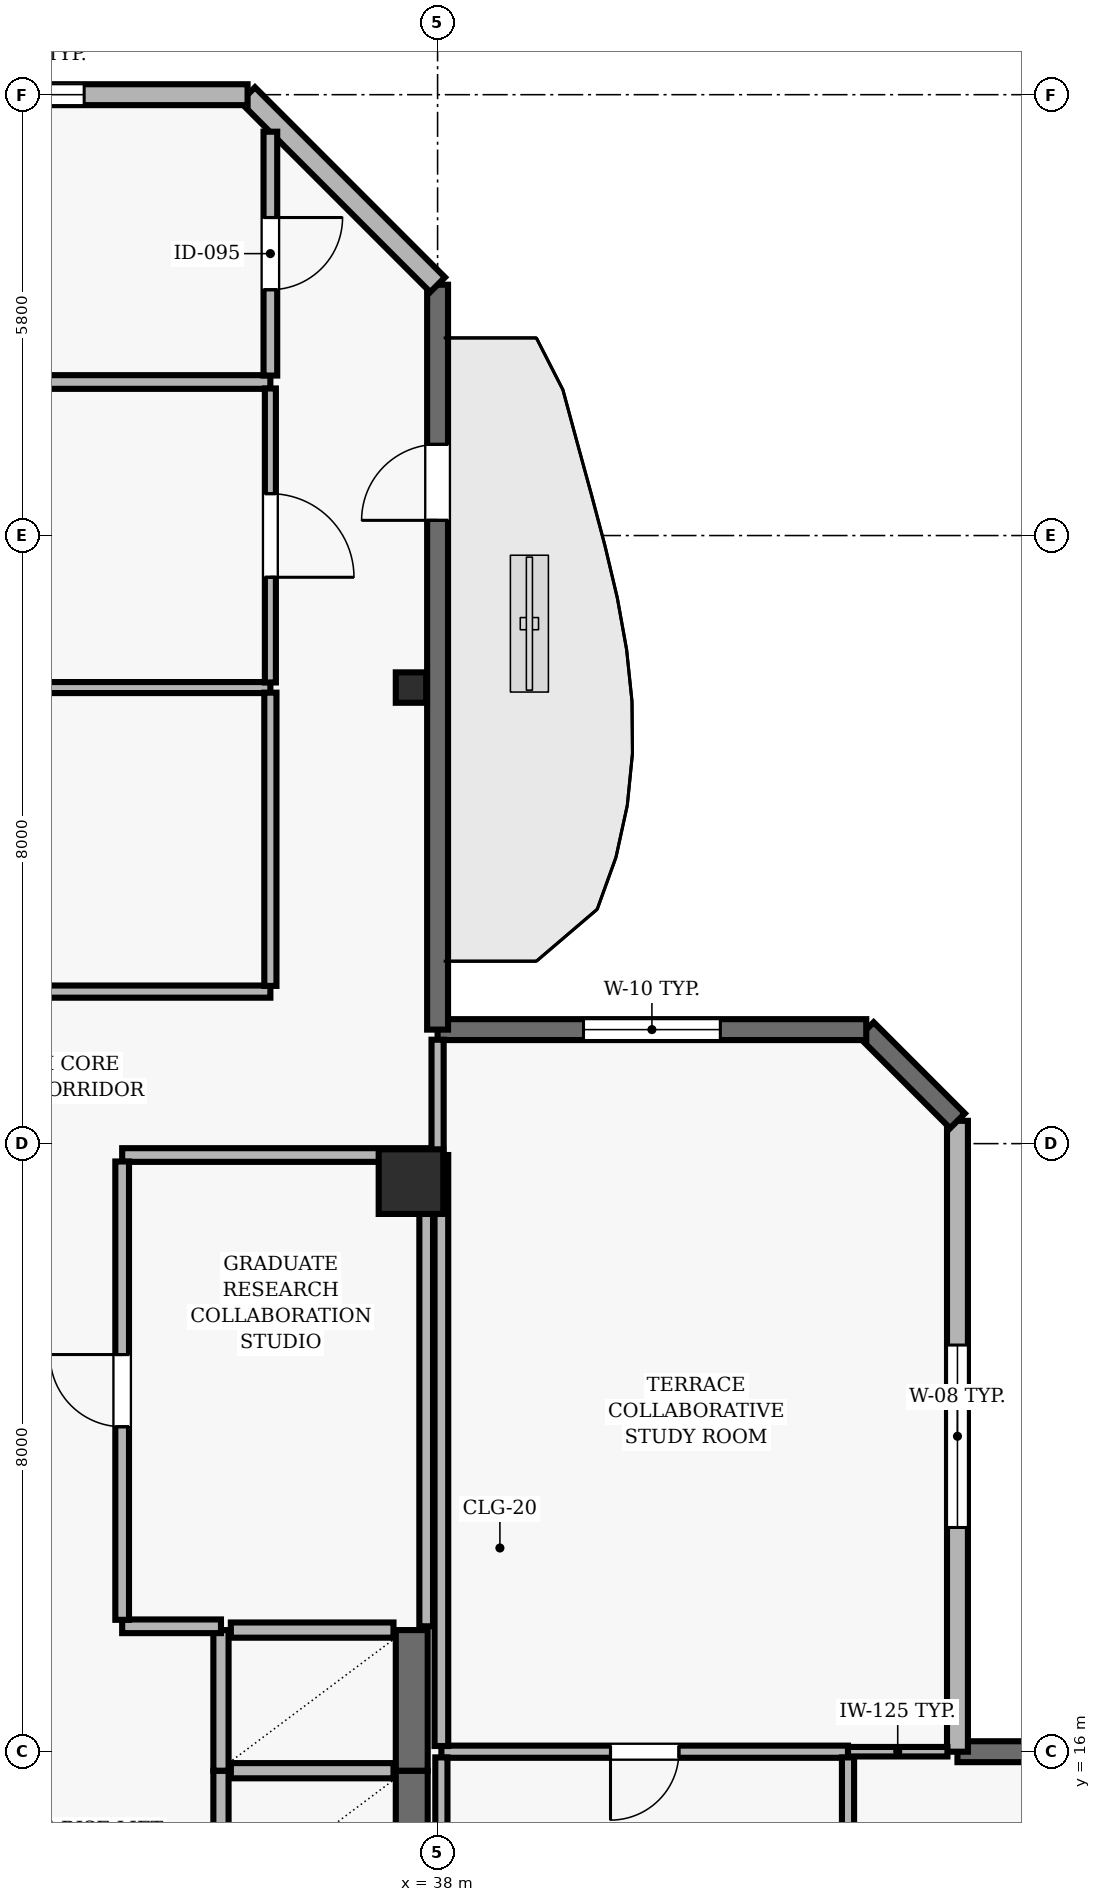
"""IFC4 building model, lengths in metres.
Left out: names, types, materials, properties, quantities, classifications, styles, units other than length and angle.
Written with IfcOpenShell. Run it as: python <this file> out.ifc"""

import sys

from ifc_helpers import new_model, si_unit, direction, frame, frame_2d, origin, origin_2d, place, context, subcontext, project, spatial, rectangle, hollow_rectangle, extrude, element, fill, save


model = new_model("IFC4")
c1 = context("Model", 3, precision=1e-05, world=origin(), true_north=direction((0.0, 1.0)))
c2 = subcontext(c1, "Body", "Model", "MODEL_VIEW")
j1 = project(units=[si_unit("LENGTHUNIT", "METRE"), si_unit("PLANEANGLEUNIT", "RADIAN")], contexts=[c1])
p1 = place(None, origin())
s1 = spatial("IfcSite", under=j1, at=p1, CompositionType="ELEMENT")
p2 = place(p1, origin())
s2 = spatial("IfcBuilding", under=s1, at=p2, CompositionType="ELEMENT")
p3 = place(p2, frame((0.0, 0.0, 256.0)))
s3 = spatial("IfcBuildingStorey", under=s2, at=p3, CompositionType="ELEMENT", Elevation=256.0)
p4 = place(p3, frame((37.65, 23.5, 0.0), z_axis=(0.0, 0.0, 1.0), x_axis=(1.0, 0.0, 0.0)))
e1 = element("IfcColumn", 1, at=p4, inside=s3, PredefinedType="COLUMN", context=c2, shape_type="SweptSolid", body=[
    extrude(rectangle(XDim=0.85, YDim=0.85, at=origin_2d()), origin(), (0.0, 0.0, 1.0), 3.9),
])
p5 = place(p3, frame((37.65, 30.0, 0.0), z_axis=(0.0, 0.0, 1.0), x_axis=(1.0, 0.0, 0.0)))
e2 = element("IfcColumn", 2, at=p5, inside=s3, PredefinedType="COLUMN", context=c2, shape_type="SweptSolid", body=[
    extrude(hollow_rectangle(XDim=0.4, YDim=0.4, WallThickness=0.02, at=origin_2d()), origin(), (0.0, 0.0, 1.0), 3.9),
])
p6 = place(p3, frame((57.3, 16.0, 0.0), z_axis=(0.0, 0.0, 1.0), x_axis=(-1.0, 0.0, 0.0)))
e3 = element("IfcWall", 3, at=p6, inside=s3, PredefinedType="SOLIDWALL", context=c2, shape_type="SweptSolid", body=[
    extrude(rectangle(XDim=12.46, YDim=0.275, at=frame_2d((6.23, 0.0))), origin(), (0.0, 0.0, 1.0), 3.69),
])
p7 = place(p6, frame((1.03, 0.0, 0.0)))
e4 = element("IfcOpeningElement", 4, at=p7, cuts=e3, PredefinedType="OPENING", context=c2, shape_type="SweptSolid", body=[
    extrude(rectangle(XDim=1.0, YDim=2.2, at=frame_2d((0.5, 1.1))), frame((0.0, 0.147, 0.0), z_axis=(0.0, -1.0, 0.0), x_axis=(1.0, 0.0, 0.0)), (0.0, 0.0, 1.0), 0.295),
])
p8 = place(p6, frame((9.345, 0.0, 0.9)))
e5 = element("IfcOpeningElement", 5, at=p8, cuts=e3, PredefinedType="OPENING", context=c2, shape_type="SweptSolid", body=[
    extrude(rectangle(XDim=1.8, YDim=1.8, at=frame_2d((0.9, 0.9))), frame((0.0, 0.147, 0.0), z_axis=(0.0, -1.0, 0.0), x_axis=(1.0, 0.0, 0.0)), (0.0, 0.0, 1.0), 0.295),
])
p9 = place(p3, frame((44.84, 16.0, 0.0), z_axis=(0.0, 0.0, 1.0), x_axis=(0.0, 1.0, 0.0)))
e6 = element("IfcWall", 6, at=p9, inside=s3, PredefinedType="SOLIDWALL", context=c2, shape_type="SweptSolid", body=[
    extrude(rectangle(XDim=8.3, YDim=0.275, at=frame_2d((4.15, 0.0))), origin(), (0.0, 0.0, 1.0), 3.69),
])
p10 = place(p9, frame((2.95, 0.0, 0.9)))
e7 = element("IfcOpeningElement", 7, at=p10, cuts=e6, PredefinedType="OPENING", context=c2, shape_type="SweptSolid", body=[
    extrude(rectangle(XDim=2.4, YDim=1.8, at=frame_2d((1.2, 0.9))), frame((0.0, 0.147, 0.0), z_axis=(0.0, -1.0, 0.0), x_axis=(1.0, 0.0, 0.0)), (0.0, 0.0, 1.0), 0.295),
])
p11 = place(p3, frame((44.84, 24.3, 0.0), z_axis=(0.0, 0.0, 1.0), x_axis=(-0.707178703759, 0.707034851297, 0.0)))
e8 = element("IfcWall", 8, at=p11, inside=s3, PredefinedType="SOLIDWALL", context=c2, shape_type="SweptSolid", body=[
    extrude(rectangle(XDim=1.697, YDim=0.275, at=frame_2d((0.849, 0.0))), origin(), (0.0, 0.0, 1.0), 3.69),
])
p12 = place(p3, frame((43.64, 25.5, 0.0), z_axis=(0.0, 0.0, 1.0), x_axis=(-1.0, 0.0, 0.0)))
e9 = element("IfcWall", 9, at=p12, inside=s3, PredefinedType="SOLIDWALL", context=c2, shape_type="SweptSolid", body=[
    extrude(rectangle(XDim=5.64, YDim=0.275, at=frame_2d((2.82, 0.0))), origin(), (0.0, 0.0, 1.0), 3.69),
])
p13 = place(p12, frame((1.92, 0.0, 0.9)))
e10 = element("IfcOpeningElement", 10, at=p13, cuts=e9, PredefinedType="OPENING", context=c2, shape_type="SweptSolid", body=[
    extrude(rectangle(XDim=1.8, YDim=2.2, at=frame_2d((0.9, 1.1))), frame((0.0, 0.147, 0.0), z_axis=(0.0, -1.0, 0.0), x_axis=(1.0, 0.0, 0.0)), (0.0, 0.0, 1.0), 0.295),
])
p14 = place(p3, frame((38.0, 25.5, 0.0), z_axis=(0.0, 0.0, 1.0), x_axis=(0.0, 1.0, 0.0)))
e11 = element("IfcWall", 11, at=p14, inside=s3, PredefinedType="SOLIDWALL", context=c2, shape_type="SweptSolid", body=[
    extrude(rectangle(XDim=9.8, YDim=0.275, at=frame_2d((4.9, 0.0))), origin(), (0.0, 0.0, 1.0), 3.69),
])
p15 = place(p14, frame((6.7, 0.0, 0.0)))
e12 = element("IfcOpeningElement", 12, at=p15, cuts=e11, PredefinedType="OPENING", context=c2, shape_type="SweptSolid", body=[
    extrude(rectangle(XDim=1.0, YDim=2.2, at=frame_2d((0.5, 1.1))), frame((0.0, 0.147, 0.0), z_axis=(0.0, -1.0, 0.0), x_axis=(1.0, 0.0, 0.0)), (0.0, 0.0, 1.0), 0.295),
])
p16 = place(p3, frame((38.0, 35.3, 0.0), z_axis=(0.0, 0.0, 1.0), x_axis=(-0.707106781187, 0.707106781187, 0.0)))
e13 = element("IfcWall", 13, at=p16, inside=s3, PredefinedType="SOLIDWALL", context=c2, shape_type="SweptSolid", body=[
    extrude(rectangle(XDim=3.536, YDim=0.275, at=frame_2d((1.768, 0.0))), origin(), (0.0, 0.0, 1.0), 3.69),
])
p17 = place(p3, frame((35.5, 37.8, 0.0), z_axis=(0.0, 0.0, 1.0), x_axis=(-1.0, 0.0, 0.0)))
e14 = element("IfcWall", 14, at=p17, inside=s3, PredefinedType="SOLIDWALL", context=c2, shape_type="SweptSolid", body=[
    extrude(rectangle(XDim=11.0, YDim=0.275, at=frame_2d((5.5, 0.0))), origin(), (0.0, 0.0, 1.0), 3.69),
])
p18 = place(p17, frame((2.15, 0.0, 0.9)))
e15 = element("IfcOpeningElement", 15, at=p18, cuts=e14, PredefinedType="OPENING", context=c2, shape_type="SweptSolid", body=[
    extrude(rectangle(XDim=1.2, YDim=1.6, at=frame_2d((0.6, 0.8))), frame((0.0, 0.147, 0.0), z_axis=(0.0, -1.0, 0.0), x_axis=(1.0, 0.0, 0.0)), (0.0, 0.0, 1.0), 0.295),
])
p19 = place(p17, frame((7.65, 0.0, 0.9)))
e16 = element("IfcOpeningElement", 16, at=p19, cuts=e14, PredefinedType="OPENING", context=c2, shape_type="SweptSolid", body=[
    extrude(rectangle(XDim=1.2, YDim=1.6, at=frame_2d((0.6, 0.8))), frame((0.0, 0.147, 0.0), z_axis=(0.0, -1.0, 0.0), x_axis=(1.0, 0.0, 0.0)), (0.0, 0.0, 1.0), 0.295),
])
p20 = place(p3, frame((35.15, 15.75, 0.0), z_axis=(0.0, 0.0, 1.0), x_axis=(0.0, -1.0, 0.0)))
e17 = element("IfcWall", 17, at=p20, inside=s3, PredefinedType="SOLIDWALL", context=c2, shape_type="SweptSolid", body=[
    extrude(rectangle(XDim=1.85, YDim=0.2, at=frame_2d((0.925, 0.0))), origin(), (0.0, 0.0, 1.0), 3.69),
])
p21 = place(p3, frame((37.66, 13.9, 0.0), z_axis=(0.0, 0.0, 1.0), x_axis=(0.0, 1.0, 0.0)))
e18 = element("IfcWall", 18, at=p21, inside=s3, PredefinedType="SHEAR", context=c2, shape_type="SweptSolid", body=[
    extrude(rectangle(XDim=1.85, YDim=0.42, at=frame_2d((0.925, 0.0))), origin(), (0.0, 0.0, 1.0), 3.69),
])
p22 = place(p3, frame((37.42, 15.75, 0.0), z_axis=(0.0, 0.0, 1.0), x_axis=(-1.0, 0.0, 0.0)))
e19 = element("IfcWall", 19, at=p22, inside=s3, PredefinedType="SOLIDWALL", context=c2, shape_type="SweptSolid", body=[
    extrude(rectangle(XDim=2.14, YDim=0.2, at=frame_2d((1.07, 0.0))), origin(), (0.0, 0.0, 1.0), 3.69),
])
p23 = place(p3, frame((35.15, 17.6, 0.0), z_axis=(0.0, 0.0, 1.0), x_axis=(0.0, -1.0, 0.0)))
e20 = element("IfcWall", 20, at=p23, inside=s3, PredefinedType="SOLIDWALL", context=c2, shape_type="SweptSolid", body=[
    extrude(rectangle(XDim=1.85, YDim=0.2, at=frame_2d((0.925, 0.0))), origin(), (0.0, 0.0, 1.0), 3.69),
])
p24 = place(p3, frame((37.66, 15.75, 0.0), z_axis=(0.0, 0.0, 1.0), x_axis=(0.0, 1.0, 0.0)))
e21 = element("IfcWall", 21, at=p24, inside=s3, PredefinedType="SHEAR", context=c2, shape_type="SweptSolid", body=[
    extrude(rectangle(XDim=1.85, YDim=0.42, at=frame_2d((0.925, 0.0))), origin(), (0.0, 0.0, 1.0), 3.69),
])
p25 = place(p3, frame((37.42, 17.6, 0.0), z_axis=(0.0, 0.0, 1.0), x_axis=(-1.0, 0.0, 0.0)))
e22 = element("IfcWall", 22, at=p25, inside=s3, PredefinedType="SOLIDWALL", context=c2, shape_type="SweptSolid", body=[
    extrude(rectangle(XDim=2.14, YDim=0.2, at=frame_2d((1.07, 0.0))), origin(), (0.0, 0.0, 1.0), 3.69),
])
p26 = place(p3, frame((33.85, 17.65, 0.0), z_axis=(0.0, 0.0, 1.0), x_axis=(1.0, 0.0, 0.0)))
e23 = element("IfcWall", 23, at=p26, inside=s3, PredefinedType="PARTITIONING", context=c2, shape_type="SweptSolid", body=[
    extrude(rectangle(XDim=1.3, YDim=0.18, at=frame_2d((0.65, 0.0))), origin(), (0.0, 0.0, 1.0), 3.69),
])
p27 = place(p3, frame((35.8, 26.0, 0.0), z_axis=(0.0, 0.0, 1.0), x_axis=(-1.0, 0.0, 0.0)))
e24 = element("IfcWall", 24, at=p27, inside=s3, PredefinedType="PARTITIONING", context=c2, shape_type="SweptSolid", body=[
    extrude(rectangle(XDim=13.667, YDim=0.16, at=frame_2d((6.833, 0.0))), origin(), (0.0, 0.0, 1.0), 3.69),
])
p28 = place(p27, frame((6.333, 0.0, 0.0)))
e25 = element("IfcOpeningElement", 25, at=p28, cuts=e24, PredefinedType="OPENING", context=c2, shape_type="SweptSolid", body=[
    extrude(rectangle(XDim=1.0, YDim=2.1, at=frame_2d((0.5, 1.05))), frame((0.0, 0.09, 0.0), z_axis=(0.0, -1.0, 0.0), x_axis=(1.0, 0.0, 0.0)), (0.0, 0.0, 1.0), 0.18),
])
p29 = place(p3, frame((35.8, 30.0, 0.0), z_axis=(0.0, 0.0, 1.0), x_axis=(-1.0, 0.0, 0.0)))
e26 = element("IfcWall", 26, at=p29, inside=s3, PredefinedType="PARTITIONING", context=c2, shape_type="SweptSolid", body=[
    extrude(rectangle(XDim=13.667, YDim=0.145, at=frame_2d((6.833, 0.0))), origin(), (0.0, 0.0, 1.0), 3.221),
])
p30 = place(p3, frame((35.8, 34.02, 0.0), z_axis=(0.0, 0.0, 1.0), x_axis=(-1.0, 0.0, 0.0)))
e27 = element("IfcWall", 27, at=p30, inside=s3, PredefinedType="PARTITIONING", context=c2, shape_type="SweptSolid", body=[
    extrude(rectangle(XDim=13.667, YDim=0.18, at=frame_2d((6.833, 0.0))), origin(), (0.0, 0.0, 1.0), 3.69),
])
p31 = place(p3, frame((37.85, 23.85, 0.0), z_axis=(0.0, 0.0, 1.0), x_axis=(-1.0, 0.0, 0.0)))
e28 = element("IfcWall", 28, at=p31, inside=s3, PredefinedType="PARTITIONING", context=c2, shape_type="SweptSolid", body=[
    extrude(rectangle(XDim=4.0, YDim=0.18, at=frame_2d((2.0, 0.0))), origin(), (0.0, 0.0, 1.0), 3.221),
])
p32 = place(p3, frame((43.4, 16.0, 0.0), z_axis=(0.0, 0.0, 1.0), x_axis=(-1.0, 0.0, 0.0)))
e29 = element("IfcWall", 29, at=p32, inside=s3, PredefinedType="PARTITIONING", context=c2, shape_type="SweptSolid", body=[
    extrude(rectangle(XDim=5.35, YDim=0.16, at=frame_2d((2.675, 0.0))), origin(), (0.0, 0.0, 1.0), 3.39),
])
p33 = place(p32, frame((2.225, 0.0, 0.0)))
e30 = element("IfcOpeningElement", 30, at=p33, cuts=e29, PredefinedType="OPENING", context=c2, shape_type="SweptSolid", body=[
    extrude(rectangle(XDim=0.9, YDim=2.1, at=frame_2d((0.45, 1.05))), frame((0.0, 0.09, 0.0), z_axis=(0.0, -1.0, 0.0), x_axis=(1.0, 0.0, 0.0)), (0.0, 0.0, 1.0), 0.18),
])
p34 = place(p3, frame((43.4, 16.0, 0.0), z_axis=(0.0, 0.0, 1.0), x_axis=(1.0, 0.0, 0.0)))
e31 = element("IfcWall", 31, at=p34, inside=s3, PredefinedType="PARTITIONING", context=c2, shape_type="SweptSolid", body=[
    extrude(rectangle(XDim=1.308, YDim=0.125, at=frame_2d((0.654, 0.0))), origin(), (0.0, 0.0, 1.0), 3.39),
])
p35 = place(p3, frame((33.85, 17.735, 0.0), z_axis=(0.0, 0.0, 1.0), x_axis=(0.0, 1.0, 0.0)))
e32 = element("IfcWall", 32, at=p35, inside=s3, PredefinedType="PARTITIONING", context=c2, shape_type="SweptSolid", body=[
    extrude(rectangle(XDim=6.03, YDim=0.18, at=frame_2d((3.015, 0.0))), origin(), (0.0, 0.0, 1.0), 3.69),
])
p36 = place(p35, frame((2.54, 0.0, 0.0)))
e33 = element("IfcOpeningElement", 33, at=p36, cuts=e32, PredefinedType="OPENING", context=c2, shape_type="SweptSolid", body=[
    extrude(rectangle(XDim=0.95, YDim=2.1, at=frame_2d((0.475, 1.05))), frame((0.0, 0.1, 0.0), z_axis=(0.0, -1.0, 0.0), x_axis=(1.0, 0.0, 0.0)), (0.0, 0.0, 1.0), 0.2),
])
p37 = place(p3, frame((35.8, 29.933, 0.0), z_axis=(0.0, 0.0, 1.0), x_axis=(0.0, -1.0, 0.0)))
e34 = element("IfcWall", 34, at=p37, inside=s3, PredefinedType="PARTITIONING", context=c2, shape_type="SweptSolid", body=[
    extrude(rectangle(XDim=3.858, YDim=0.16, at=frame_2d((1.929, 0.0))), origin(), (0.0, 0.0, 1.0), 3.69),
])
p38 = place(p3, frame((35.8, 33.935, 0.0), z_axis=(0.0, 0.0, 1.0), x_axis=(0.0, -1.0, 0.0)))
e35 = element("IfcWall", 35, at=p38, inside=s3, PredefinedType="PARTITIONING", context=c2, shape_type="SweptSolid", body=[
    extrude(rectangle(XDim=3.868, YDim=0.145, at=frame_2d((1.934, 0.0))), origin(), (0.0, 0.0, 1.0), 3.69),
])
p39 = place(p38, frame((1.384, 0.0, 0.0)))
e36 = element("IfcOpeningElement", 36, at=p39, cuts=e35, PredefinedType="OPENING", context=c2, shape_type="SweptSolid", body=[
    extrude(rectangle(XDim=1.1, YDim=2.15, at=frame_2d((0.55, 1.075))), frame((0.0, 0.083, 0.0), z_axis=(0.0, -1.0, 0.0), x_axis=(1.0, 0.0, 0.0)), (0.0, 0.0, 1.0), 0.165),
])
p40 = place(p3, frame((35.8, 37.313, 0.0), z_axis=(0.0, 0.0, 1.0), x_axis=(0.0, -1.0, 0.0)))
e37 = element("IfcWall", 37, at=p40, inside=s3, PredefinedType="PARTITIONING", context=c2, shape_type="SweptSolid", body=[
    extrude(rectangle(XDim=3.208, YDim=0.18, at=frame_2d((1.604, 0.0))), origin(), (0.0, 0.0, 1.0), 3.69),
])
p41 = place(p40, frame((1.129, 0.0, 0.0)))
e38 = element("IfcOpeningElement", 38, at=p41, cuts=e37, PredefinedType="OPENING", context=c2, shape_type="SweptSolid", body=[
    extrude(rectangle(XDim=0.95, YDim=2.1, at=frame_2d((0.475, 1.05))), frame((0.0, 0.1, 0.0), z_axis=(0.0, -1.0, 0.0), x_axis=(1.0, 0.0, 0.0)), (0.0, 0.0, 1.0), 0.2),
])
p42 = place(p3, frame((37.85, 17.65, 0.0), z_axis=(0.0, 0.0, 1.0), x_axis=(0.0, 1.0, 0.0)))
e39 = element("IfcWall", 39, at=p42, inside=s3, PredefinedType="PARTITIONING", context=c2, shape_type="SweptSolid", body=[
    extrude(rectangle(XDim=6.115, YDim=0.18, at=frame_2d((3.058, 0.0))), origin(), (0.0, 0.0, 1.0), 3.221),
])
p43 = place(p3, frame((38.0, 23.85, 0.0), z_axis=(0.0, 0.0, 1.0), x_axis=(0.0, 1.0, 0.0)))
e40 = element("IfcWall", 40, at=p43, inside=s3, PredefinedType="PARTITIONING", context=c2, shape_type="SweptSolid", body=[
    extrude(rectangle(XDim=1.517, YDim=0.16, at=frame_2d((0.758, 0.0))), origin(), (0.0, 0.0, 1.0), 3.221),
])
p44 = place(p3, frame((38.05, 15.925, 0.0), z_axis=(0.0, 0.0, 1.0), x_axis=(0.0, -1.0, 0.0)))
e41 = element("IfcWall", 41, at=p44, inside=s3, PredefinedType="PARTITIONING", context=c2, shape_type="SweptSolid", body=[
    extrude(rectangle(XDim=6.375, YDim=0.16, at=frame_2d((3.188, 0.0))), origin(), (0.0, 0.0, 1.0), 3.221),
])
p45 = place(p3, frame((38.05, 23.85, 0.0), z_axis=(0.0, 0.0, 1.0), x_axis=(0.0, -1.0, 0.0)))
e42 = element("IfcWall", 42, at=p45, inside=s3, PredefinedType="PARTITIONING", context=c2, shape_type="SweptSolid", body=[
    extrude(rectangle(XDim=7.775, YDim=0.18, at=frame_2d((3.888, 0.0))), origin(), (0.0, 0.0, 1.0), 3.221),
])
p46 = place(p3, frame((43.4, 10.425, 0.0), z_axis=(0.0, 0.0, 1.0), x_axis=(0.0, 1.0, 0.0)))
e43 = element("IfcWall", 43, at=p46, inside=s3, PredefinedType="PARTITIONING", context=c2, shape_type="SweptSolid", body=[
    extrude(rectangle(XDim=5.5, YDim=0.16, at=frame_2d((2.75, 0.0))), origin(), (0.0, 0.0, 1.0), 3.69),
])
p47 = place(p46, frame((2.25, 0.0, 0.0)))
e44 = element("IfcOpeningElement", 44, at=p47, cuts=e43, PredefinedType="OPENING", context=c2, shape_type="SweptSolid", body=[
    extrude(rectangle(XDim=1.0, YDim=2.1, at=frame_2d((0.5, 1.05))), frame((0.0, 0.09, 0.0), z_axis=(0.0, -1.0, 0.0), x_axis=(1.0, 0.0, 0.0)), (0.0, 0.0, 1.0), 0.18),
])
p48 = place(p10, origin())
e45 = element("IfcWindow", 45, at=p48, inside=s3, PartitioningType="SINGLE_PANEL", PredefinedType="WINDOW", context=c2, shape_type="SweptSolid", body=[
    extrude(rectangle(XDim=2.4, YDim=1.8, at=frame_2d((1.2, 0.9))), frame((0.0, 0.03, 0.0), z_axis=(0.0, -1.0, 0.0), x_axis=(1.0, 0.0, 0.0)), (0.0, 0.0, 1.0), 0.06),
])
fill(e7, e45)
p49 = place(p13, origin())
e46 = element("IfcWindow", 46, at=p49, inside=s3, PartitioningType="SINGLE_PANEL", PredefinedType="WINDOW", context=c2, shape_type="SweptSolid", body=[
    extrude(rectangle(XDim=1.8, YDim=2.2, at=frame_2d((0.9, 1.1))), frame((0.0, 0.03, 0.0), z_axis=(0.0, -1.0, 0.0), x_axis=(1.0, 0.0, 0.0)), (0.0, 0.0, 1.0), 0.06),
])
fill(e10, e46)
p50 = place(p15, origin())
e47 = element("IfcDoor", 47, at=p50, inside=s3, OperationType="SINGLE_SWING_LEFT", PredefinedType="DOOR", context=c2, shape_type="SweptSolid", body=[
    extrude(rectangle(XDim=1.0, YDim=2.2, at=frame_2d((0.5, 1.1))), frame((0.0, 0.025, 0.0), z_axis=(0.0, -1.0, 0.0), x_axis=(1.0, 0.0, 0.0)), (0.0, 0.0, 1.0), 0.05),
])
fill(e12, e47)
p51 = place(p18, origin())
e48 = element("IfcWindow", 48, at=p51, inside=s3, PartitioningType="SINGLE_PANEL", PredefinedType="WINDOW", context=c2, shape_type="SweptSolid", body=[
    extrude(rectangle(XDim=1.2, YDim=1.6, at=frame_2d((0.6, 0.8))), frame((0.0, 0.03, 0.0), z_axis=(0.0, -1.0, 0.0), x_axis=(1.0, 0.0, 0.0)), (0.0, 0.0, 1.0), 0.06),
])
fill(e15, e48)
p52 = place(p36, origin())
e49 = element("IfcDoor", 49, at=p52, inside=s3, OperationType="SINGLE_SWING_RIGHT", PredefinedType="DOOR", context=c2, shape_type="SweptSolid", body=[
    extrude(rectangle(XDim=0.95, YDim=2.1, at=frame_2d((0.475, 1.05))), frame((0.0, 0.025, 0.0), z_axis=(0.0, -1.0, 0.0), x_axis=(1.0, 0.0, 0.0)), (0.0, 0.0, 1.0), 0.05),
])
fill(e33, e49)
p53 = place(p39, origin())
e50 = element("IfcDoor", 50, at=p53, inside=s3, OperationType="SINGLE_SWING_RIGHT", PredefinedType="DOOR", context=c2, shape_type="SweptSolid", body=[
    extrude(rectangle(XDim=1.1, YDim=2.15, at=frame_2d((0.55, 1.075))), frame((0.0, 0.025, 0.0), z_axis=(0.0, -1.0, 0.0), x_axis=(1.0, 0.0, 0.0)), (0.0, 0.0, 1.0), 0.05),
])
fill(e36, e50)
p54 = place(p41, origin())
e51 = element("IfcDoor", 51, at=p54, inside=s3, OperationType="SINGLE_SWING_LEFT", PredefinedType="DOOR", context=c2, shape_type="SweptSolid", body=[
    extrude(rectangle(XDim=0.95, YDim=2.1, at=frame_2d((0.475, 1.05))), frame((0.0, 0.025, 0.0), z_axis=(0.0, -1.0, 0.0), x_axis=(1.0, 0.0, 0.0)), (0.0, 0.0, 1.0), 0.05),
])
fill(e38, e51)
p55 = place(p33, origin())
e52 = element("IfcDoor", 52, at=p55, inside=s3, OperationType="SINGLE_SWING_RIGHT", PredefinedType="DOOR", context=c2, shape_type="SweptSolid", body=[
    extrude(rectangle(XDim=0.9, YDim=2.1, at=frame_2d((0.45, 1.05))), frame((0.0, 0.025, 0.0), z_axis=(0.0, -1.0, 0.0), x_axis=(1.0, 0.0, 0.0)), (0.0, 0.0, 1.0), 0.05),
])
fill(e30, e52)
save(model, sys.argv[1])
